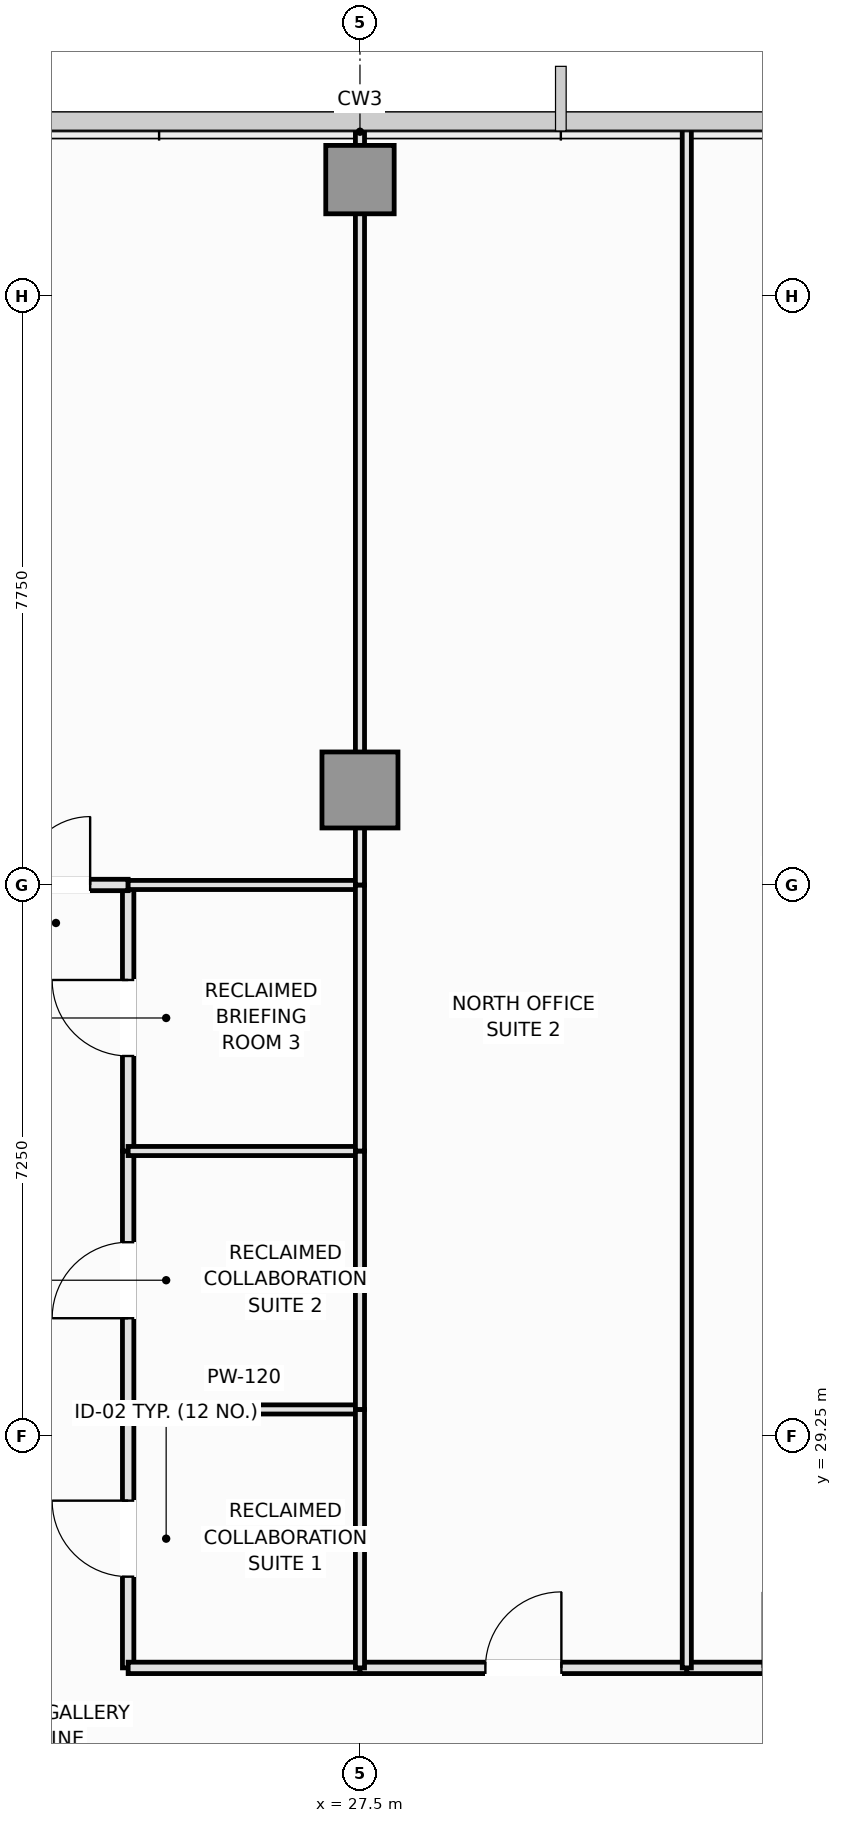
"""IFC4 building model, lengths in metres.
Left out: names, types, materials, properties, quantities, classifications, styles, units other than length and angle.
Written with IfcOpenShell. Run it as: python <this file> out.ifc"""

import sys

from ifc_helpers import new_model, si_unit, direction, frame, frame_2d, origin, origin_2d, place, context, subcontext, project, spatial, rectangle, extrude, element, fill, save


model = new_model("IFC4")
c1 = context("Model", 3, precision=1e-05, world=origin(), true_north=direction((0.0, 1.0)))
c2 = subcontext(c1, "Body", "Model", "MODEL_VIEW")
j1 = project(units=[si_unit("LENGTHUNIT", "METRE"), si_unit("PLANEANGLEUNIT", "RADIAN")], contexts=[c1])
p1 = place(None, origin())
s1 = spatial("IfcSite", under=j1, at=p1, CompositionType="ELEMENT")
p2 = place(p1, origin())
s2 = spatial("IfcBuilding", under=s1, at=p2, CompositionType="ELEMENT")
p3 = place(p2, frame((0.0, 0.0, 102.25)))
s3 = spatial("IfcBuildingStorey", under=s2, at=p3, CompositionType="ELEMENT", Elevation=102.25)
p4 = place(p3, frame((27.5, 37.75, 0.0), z_axis=(0.0, 0.0, 1.0), x_axis=(1.0, 0.0, 0.0)))
e1 = element("IfcColumn", 1, at=p4, inside=s3, PredefinedType="COLUMN", context=c2, shape_type="SweptSolid", body=[
    extrude(rectangle(XDim=1.0, YDim=1.0, at=origin_2d()), origin(), (0.0, 0.0, 1.0), 3.55),
])
p5 = place(p3, frame((27.5, 45.78, 0.0), z_axis=(0.0, 0.0, 1.0), x_axis=(1.0, 0.0, 0.0)))
e2 = element("IfcColumn", 2, at=p5, inside=s3, PredefinedType="COLUMN", context=c2, shape_type="SweptSolid", body=[
    extrude(rectangle(XDim=0.9, YDim=0.9, at=origin_2d()), origin(), (0.0, 0.0, 1.0), 3.55),
])
p6 = place(p3, frame((24.45, 26.2, 0.0), z_axis=(0.0, 0.0, 1.0), x_axis=(0.0, 1.0, 0.0)))
e3 = element("IfcWall", 3, at=p6, inside=s3, PredefinedType="PARTITIONING", context=c2, shape_type="SweptSolid", body=[
    extrude(rectangle(XDim=3.4, YDim=0.15, at=frame_2d((1.7, 0.0))), origin(), (0.0, 0.0, 1.0), 3.37),
])
p7 = place(p6, frame((1.2, 0.0, 0.0)))
e4 = element("IfcOpeningElement", 4, at=p7, cuts=e3, PredefinedType="OPENING", context=c2, shape_type="SweptSolid", body=[
    extrude(rectangle(XDim=1.0, YDim=2.15, at=frame_2d((0.5, 1.075))), frame((0.0, 0.085, 0.0), z_axis=(0.0, -1.0, 0.0), x_axis=(1.0, 0.0, 0.0)), (0.0, 0.0, 1.0), 0.17),
])
p8 = place(p3, frame((24.45, 29.6, 0.0), z_axis=(0.0, 0.0, 1.0), x_axis=(0.0, 1.0, 0.0)))
e5 = element("IfcWall", 5, at=p8, inside=s3, PredefinedType="PARTITIONING", context=c2, shape_type="SweptSolid", body=[
    extrude(rectangle(XDim=3.4, YDim=0.15, at=frame_2d((1.7, 0.0))), origin(), (0.0, 0.0, 1.0), 3.37),
])
p9 = place(p8, frame((1.2, 0.0, 0.0)))
e6 = element("IfcOpeningElement", 6, at=p9, cuts=e5, PredefinedType="OPENING", context=c2, shape_type="SweptSolid", body=[
    extrude(rectangle(XDim=1.0, YDim=2.15, at=frame_2d((0.5, 1.075))), frame((0.0, 0.085, 0.0), z_axis=(0.0, -1.0, 0.0), x_axis=(1.0, 0.0, 0.0)), (0.0, 0.0, 1.0), 0.17),
])
p10 = place(p3, frame((24.45, 33.0, 0.0), z_axis=(0.0, 0.0, 1.0), x_axis=(0.0, 1.0, 0.0)))
e7 = element("IfcWall", 7, at=p10, inside=s3, PredefinedType="PARTITIONING", context=c2, shape_type="SweptSolid", body=[
    extrude(rectangle(XDim=3.5, YDim=0.15, at=frame_2d((1.75, 0.0))), origin(), (0.0, 0.0, 1.0), 3.37),
])
p11 = place(p10, frame((1.25, 0.0, 0.0)))
e8 = element("IfcOpeningElement", 8, at=p11, cuts=e7, PredefinedType="OPENING", context=c2, shape_type="SweptSolid", body=[
    extrude(rectangle(XDim=1.0, YDim=2.15, at=frame_2d((0.5, 1.075))), frame((0.0, 0.085, 0.0), z_axis=(0.0, -1.0, 0.0), x_axis=(1.0, 0.0, 0.0)), (0.0, 0.0, 1.0), 0.17),
])
p12 = place(p3, frame((22.55, 36.5, 0.0), z_axis=(0.0, 0.0, 1.0), x_axis=(1.0, 0.0, 0.0)))
e9 = element("IfcWall", 9, at=p12, inside=s3, PredefinedType="PARTITIONING", context=c2, shape_type="SweptSolid", body=[
    extrude(rectangle(XDim=1.9, YDim=0.15, at=frame_2d((0.95, 0.0))), origin(), (0.0, 0.0, 1.0), 3.37),
])
p13 = place(p12, frame((0.5, 0.0, 0.0)))
e10 = element("IfcOpeningElement", 10, at=p13, cuts=e9, PredefinedType="OPENING", context=c2, shape_type="SweptSolid", body=[
    extrude(rectangle(XDim=0.9, YDim=2.1, at=frame_2d((0.45, 1.05))), frame((0.0, 0.085, 0.0), z_axis=(0.0, -1.0, 0.0), x_axis=(1.0, 0.0, 0.0)), (0.0, 0.0, 1.0), 0.17),
])
p14 = place(p3, frame((24.45, 26.2, 0.0), z_axis=(0.0, 0.0, 1.0), x_axis=(1.0, 0.0, 0.0)))
e11 = element("IfcWall", 11, at=p14, inside=s3, PredefinedType="PARTITIONING", context=c2, shape_type="SweptSolid", body=[
    extrude(rectangle(XDim=3.05, YDim=0.15, at=frame_2d((1.525, 0.0))), origin(), (0.0, 0.0, 1.0), 3.37),
])
p15 = place(p3, frame((27.5, 26.2, 0.0), z_axis=(0.0, 0.0, 1.0), x_axis=(1.0, 0.0, 0.0)))
e12 = element("IfcWall", 12, at=p15, inside=s3, PredefinedType="PARTITIONING", context=c2, shape_type="SweptSolid", body=[
    extrude(rectangle(XDim=4.3, YDim=0.15, at=frame_2d((2.15, 0.0))), origin(), (0.0, 0.0, 1.0), 3.37),
])
p16 = place(p15, frame((1.65, 0.0, 0.0)))
e13 = element("IfcOpeningElement", 13, at=p16, cuts=e12, PredefinedType="OPENING", context=c2, shape_type="SweptSolid", body=[
    extrude(rectangle(XDim=1.0, YDim=2.15, at=frame_2d((0.5, 1.075))), frame((0.0, 0.085, 0.0), z_axis=(0.0, -1.0, 0.0), x_axis=(1.0, 0.0, 0.0)), (0.0, 0.0, 1.0), 0.17),
])
p17 = place(p3, frame((31.8, 26.2, 0.0), z_axis=(0.0, 0.0, 1.0), x_axis=(1.0, 0.0, 0.0)))
e14 = element("IfcWall", 14, at=p17, inside=s3, PredefinedType="PARTITIONING", context=c2, shape_type="SweptSolid", body=[
    extrude(rectangle(XDim=3.0, YDim=0.15, at=frame_2d((1.5, 0.0))), origin(), (0.0, 0.0, 1.0), 3.37),
])
p18 = place(p17, frame((1.0, 0.0, 0.0)))
e15 = element("IfcOpeningElement", 15, at=p18, cuts=e14, PredefinedType="OPENING", context=c2, shape_type="SweptSolid", body=[
    extrude(rectangle(XDim=1.0, YDim=2.15, at=frame_2d((0.5, 1.075))), frame((0.0, 0.085, 0.0), z_axis=(0.0, -1.0, 0.0), x_axis=(1.0, 0.0, 0.0)), (0.0, 0.0, 1.0), 0.17),
])
p19 = place(p3, frame((24.45, 29.6, 0.0), z_axis=(0.0, 0.0, 1.0), x_axis=(1.0, 0.0, 0.0)))
e16 = element("IfcWall", 16, at=p19, inside=s3, PredefinedType="PARTITIONING", context=c2, shape_type="SweptSolid", body=[
    extrude(rectangle(XDim=3.05, YDim=0.12, at=frame_2d((1.525, 0.0))), origin(), (0.0, 0.0, 1.0), 3.37),
])
p20 = place(p3, frame((27.5, 26.2, 0.0), z_axis=(0.0, 0.0, 1.0), x_axis=(0.0, 1.0, 0.0)))
e17 = element("IfcWall", 17, at=p20, inside=s3, PredefinedType="PARTITIONING", context=c2, shape_type="SweptSolid", body=[
    extrude(rectangle(XDim=3.4, YDim=0.12, at=frame_2d((1.7, 0.0))), origin(), (0.0, 0.0, 1.0), 3.37),
])
p21 = place(p3, frame((24.45, 33.0, 0.0), z_axis=(0.0, 0.0, 1.0), x_axis=(1.0, 0.0, 0.0)))
e18 = element("IfcWall", 18, at=p21, inside=s3, PredefinedType="PARTITIONING", context=c2, shape_type="SweptSolid", body=[
    extrude(rectangle(XDim=3.05, YDim=0.12, at=frame_2d((1.525, 0.0))), origin(), (0.0, 0.0, 1.0), 3.37),
])
p22 = place(p3, frame((27.5, 29.6, 0.0), z_axis=(0.0, 0.0, 1.0), x_axis=(0.0, 1.0, 0.0)))
e19 = element("IfcWall", 19, at=p22, inside=s3, PredefinedType="PARTITIONING", context=c2, shape_type="SweptSolid", body=[
    extrude(rectangle(XDim=3.4, YDim=0.12, at=frame_2d((1.7, 0.0))), origin(), (0.0, 0.0, 1.0), 3.37),
])
p23 = place(p3, frame((24.45, 36.5, 0.0), z_axis=(0.0, 0.0, 1.0), x_axis=(1.0, 0.0, 0.0)))
e20 = element("IfcWall", 20, at=p23, inside=s3, PredefinedType="PARTITIONING", context=c2, shape_type="SweptSolid", body=[
    extrude(rectangle(XDim=3.05, YDim=0.12, at=frame_2d((1.525, 0.0))), origin(), (0.0, 0.0, 1.0), 3.37),
])
p24 = place(p3, frame((27.5, 33.0, 0.0), z_axis=(0.0, 0.0, 1.0), x_axis=(0.0, 1.0, 0.0)))
e21 = element("IfcWall", 21, at=p24, inside=s3, PredefinedType="PARTITIONING", context=c2, shape_type="SweptSolid", body=[
    extrude(rectangle(XDim=3.5, YDim=0.12, at=frame_2d((1.75, 0.0))), origin(), (0.0, 0.0, 1.0), 3.37),
])
p25 = place(p3, frame((27.5, 36.5, 0.0), z_axis=(0.0, 0.0, 1.0), x_axis=(0.0, 1.0, 0.0)))
e22 = element("IfcWall", 22, at=p25, inside=s3, PredefinedType="PARTITIONING", context=c2, shape_type="SweptSolid", body=[
    extrude(rectangle(XDim=9.99, YDim=0.12, at=frame_2d((4.995, 0.0))), origin(), (0.0, 0.0, 1.0), 2.87),
])
p26 = place(p3, frame((31.8, 26.2, 0.0), z_axis=(0.0, 0.0, 1.0), x_axis=(0.0, 1.0, 0.0)))
e23 = element("IfcWall", 23, at=p26, inside=s3, PredefinedType="PARTITIONING", context=c2, shape_type="SweptSolid", body=[
    extrude(rectangle(XDim=20.29, YDim=0.12, at=frame_2d((10.145, 0.0))), origin(), (0.0, 0.0, 1.0), 3.37),
])
p27 = place(p7, origin())
e24 = element("IfcDoor", 24, at=p27, inside=s3, OperationType="SINGLE_SWING_RIGHT", PredefinedType="DOOR", context=c2, shape_type="SweptSolid", body=[
    extrude(rectangle(XDim=1.0, YDim=2.15, at=frame_2d((0.5, 1.075))), frame((0.0, 0.025, 0.0), z_axis=(0.0, -1.0, 0.0), x_axis=(1.0, 0.0, 0.0)), (0.0, 0.0, 1.0), 0.05),
])
fill(e4, e24)
p28 = place(p9, origin())
e25 = element("IfcDoor", 25, at=p28, inside=s3, OperationType="SINGLE_SWING_LEFT", PredefinedType="DOOR", context=c2, shape_type="SweptSolid", body=[
    extrude(rectangle(XDim=1.0, YDim=2.15, at=frame_2d((0.5, 1.075))), frame((0.0, 0.025, 0.0), z_axis=(0.0, -1.0, 0.0), x_axis=(1.0, 0.0, 0.0)), (0.0, 0.0, 1.0), 0.05),
])
fill(e6, e25)
p29 = place(p11, origin())
e26 = element("IfcDoor", 26, at=p29, inside=s3, OperationType="SINGLE_SWING_RIGHT", PredefinedType="DOOR", context=c2, shape_type="SweptSolid", body=[
    extrude(rectangle(XDim=1.0, YDim=2.15, at=frame_2d((0.5, 1.075))), frame((0.0, 0.025, 0.0), z_axis=(0.0, -1.0, 0.0), x_axis=(1.0, 0.0, 0.0)), (0.0, 0.0, 1.0), 0.05),
])
fill(e8, e26)
p30 = place(p13, origin())
e27 = element("IfcDoor", 27, at=p30, inside=s3, OperationType="SINGLE_SWING_RIGHT", PredefinedType="DOOR", context=c2, shape_type="SweptSolid", body=[
    extrude(rectangle(XDim=0.9, YDim=2.1, at=frame_2d((0.45, 1.05))), frame((0.0, 0.025, 0.0), z_axis=(0.0, -1.0, 0.0), x_axis=(1.0, 0.0, 0.0)), (0.0, 0.0, 1.0), 0.05),
])
fill(e10, e27)
p31 = place(p16, origin())
e28 = element("IfcDoor", 28, at=p31, inside=s3, OperationType="SINGLE_SWING_RIGHT", PredefinedType="DOOR", context=c2, shape_type="SweptSolid", body=[
    extrude(rectangle(XDim=1.0, YDim=2.15, at=frame_2d((0.5, 1.075))), frame((0.0, 0.025, 0.0), z_axis=(0.0, -1.0, 0.0), x_axis=(1.0, 0.0, 0.0)), (0.0, 0.0, 1.0), 0.05),
])
fill(e13, e28)
save(model, sys.argv[1])
